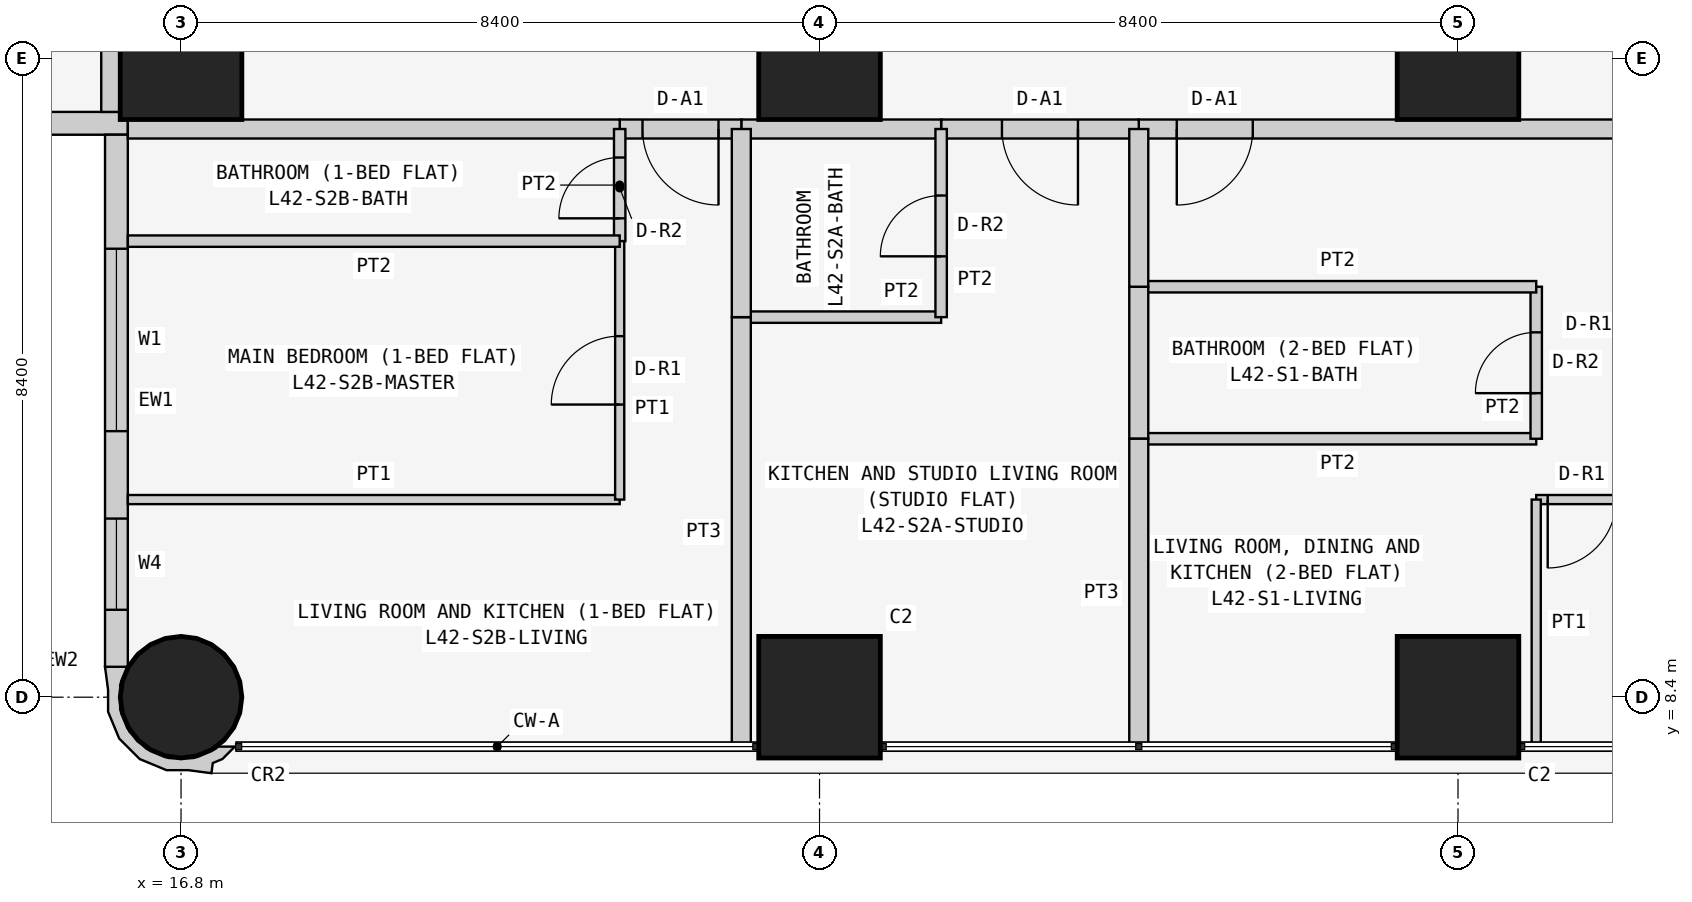
"""IFC4 building model, lengths in metres.
Left out: names, types, materials, properties, quantities, classifications, styles, units other than length and angle.
Written with IfcOpenShell. Run it as: python <this file> out.ifc"""

import sys

from ifc_helpers import new_model, si_unit, direction, frame, frame_2d, origin, origin_2d, place, context, subcontext, project, spatial, polyline, rectangle, circle, outline, extrude, element, fill, save


model = new_model("IFC4")
c1 = context("Model", 3, precision=1e-05, world=origin(), true_north=direction((0.0, 1.0)))
c2 = subcontext(c1, "Body", "Model", "MODEL_VIEW")
j1 = project(units=[si_unit("LENGTHUNIT", "METRE"), si_unit("PLANEANGLEUNIT", "RADIAN")], contexts=[c1])
p1 = place(None, origin())
s1 = spatial("IfcSite", under=j1, at=p1, CompositionType="ELEMENT")
p2 = place(p1, origin())
s2 = spatial("IfcBuilding", under=s1, at=p2, CompositionType="ELEMENT")
p3 = place(p2, frame((0.0, 0.0, 162.9)))
s3 = spatial("IfcBuildingStorey", under=s2, at=p3, CompositionType="ELEMENT", Elevation=162.9)
p4 = place(p3, frame((16.8, 8.4, 0.0), z_axis=(0.0, 0.0, 1.0), x_axis=(1.0, 0.0, 0.0)))
e1 = element("IfcColumn", 1, at=p4, inside=s3, PredefinedType="COLUMN", context=c2, shape_type="SweptSolid", body=[
    extrude(circle(Radius=0.8, at=origin_2d()), origin(), (0.0, 0.0, 1.0), 3.6),
])
for number, where, z_axis, x_axis in (
    (2, (16.8, 16.8, 0.0), (0.0, 0.0, 1.0), (1.0, 0.0, 0.0)),
    (3, (25.2, 8.4, 0.0), (0.0, 0.0, 1.0), (1.0, 0.0, 0.0)),
    (4, (25.2, 16.8, 0.0), (0.0, 0.0, 1.0), (1.0, 0.0, 0.0)),
    (5, (33.6, 8.4, 0.0), (0.0, 0.0, 1.0), (1.0, 0.0, 0.0)),
    (6, (33.6, 16.8, 0.0), (0.0, 0.0, 1.0), (1.0, 0.0, 0.0)),
):
    element("IfcColumn", number, at=place(p3, frame(where, z_axis=z_axis, x_axis=x_axis)), inside=s3, PredefinedType="COLUMN", context=c2, shape_type="SweptSolid", body=[
        extrude(rectangle(XDim=1.6, YDim=1.6, at=origin_2d()), origin(), (0.0, 0.0, 1.0), 3.6),
    ])
p5 = place(p3, frame((0.4, 15.95, 0.0), z_axis=(0.0, 0.0, 1.0), x_axis=(1.0, 0.0, 0.0)))
e7 = element("IfcWall", 7, at=p5, inside=s3, PredefinedType="SOLIDWALL", context=c2, shape_type="SweptSolid", body=[
    extrude(rectangle(XDim=15.7, YDim=0.3, at=frame_2d((7.85, 0.0))), origin(), (0.0, 0.0, 1.0), 3.45),
])
p6 = place(p5, frame((12.4, 0.0, 0.9)))
e8 = element("IfcOpeningElement", 8, at=p6, cuts=e7, PredefinedType="OPENING", context=c2, shape_type="SweptSolid", body=[
    extrude(rectangle(XDim=1.8, YDim=1.5, at=frame_2d((0.9, 0.75))), frame((0.0, 0.16, 0.0), z_axis=(0.0, -1.0, 0.0), x_axis=(1.0, 0.0, 0.0)), (0.0, 0.0, 1.0), 0.32),
])
p7 = place(p5, frame((9.55, 0.0, 1.5)))
e9 = element("IfcOpeningElement", 9, at=p7, cuts=e7, PredefinedType="OPENING", context=c2, shape_type="SweptSolid", body=[
    extrude(rectangle(XDim=0.9, YDim=0.7, at=frame_2d((0.45, 0.35))), frame((0.0, 0.16, 0.0), z_axis=(0.0, -1.0, 0.0), x_axis=(1.0, 0.0, 0.0)), (0.0, 0.0, 1.0), 0.32),
])
p8 = place(p5, frame((5.1, 0.0, 0.9)))
e10 = element("IfcOpeningElement", 10, at=p8, cuts=e7, PredefinedType="OPENING", context=c2, shape_type="SweptSolid", body=[
    extrude(rectangle(XDim=1.8, YDim=1.5, at=frame_2d((0.9, 0.75))), frame((0.0, 0.16, 0.0), z_axis=(0.0, -1.0, 0.0), x_axis=(1.0, 0.0, 0.0)), (0.0, 0.0, 1.0), 0.32),
])
p9 = place(p5, frame((2.0, 0.0, 0.0)))
e11 = element("IfcOpeningElement", 11, at=p9, cuts=e7, PredefinedType="OPENING", context=c2, shape_type="SweptSolid", body=[
    extrude(rectangle(XDim=0.9, YDim=2.4, at=frame_2d((0.45, 1.2))), frame((0.0, 0.16, 0.0), z_axis=(0.0, -1.0, 0.0), x_axis=(1.0, 0.0, 0.0)), (0.0, 0.0, 1.0), 0.32),
])
p10 = place(p5, frame((0.7, 0.0, 0.9)))
e12 = element("IfcOpeningElement", 12, at=p10, cuts=e7, PredefinedType="OPENING", context=c2, shape_type="SweptSolid", body=[
    extrude(rectangle(XDim=1.2, YDim=1.5, at=frame_2d((0.6, 0.75))), frame((0.0, 0.16, 0.0), z_axis=(0.0, -1.0, 0.0), x_axis=(1.0, 0.0, 0.0)), (0.0, 0.0, 1.0), 0.32),
])
p11 = place(p3, frame((15.95, 15.8, 0.0), z_axis=(0.0, 0.0, 1.0), x_axis=(0.0, -1.0, 0.0)))
e13 = element("IfcWall", 13, at=p11, inside=s3, PredefinedType="SOLIDWALL", context=c2, shape_type="SweptSolid", body=[
    extrude(rectangle(XDim=7.0, YDim=0.3, at=frame_2d((3.5, 0.0))), origin(), (0.0, 0.0, 1.0), 3.45),
])
p12 = place(p11, frame((1.5, 0.0, 0.9)))
e14 = element("IfcOpeningElement", 14, at=p12, cuts=e13, PredefinedType="OPENING", context=c2, shape_type="SweptSolid", body=[
    extrude(rectangle(XDim=2.4, YDim=1.5, at=frame_2d((1.2, 0.75))), frame((0.0, 0.16, 0.0), z_axis=(0.0, -1.0, 0.0), x_axis=(1.0, 0.0, 0.0)), (0.0, 0.0, 1.0), 0.32),
])
p13 = place(p11, frame((5.05, 0.0, 0.9)))
e15 = element("IfcOpeningElement", 15, at=p13, cuts=e13, PredefinedType="OPENING", context=c2, shape_type="SweptSolid", body=[
    extrude(rectangle(XDim=1.2, YDim=1.5, at=frame_2d((0.6, 0.75))), frame((0.0, 0.16, 0.0), z_axis=(0.0, -1.0, 0.0), x_axis=(1.0, 0.0, 0.0)), (0.0, 0.0, 1.0), 0.32),
])
p14 = place(p3, frame((15.983, 8.727, 0.0), z_axis=(0.0, 0.0, 1.0), x_axis=(-0.343276641956, -0.93923434088, 0.0)))
e16 = element("IfcWall", 16, at=p14, inside=s3, PredefinedType="SOLIDWALL", context=c2, shape_type="SweptSolid", body=[
    extrude(outline(polyline([(0.829, 1.599), (0.697, 1.569), (0.604, 1.67), (0.394, 1.767), (0.471, 1.556), (0.509, 1.539), (0.724, 1.304), (0.833, 1.005), (0.82, 0.686), (0.686, 0.397), (0.451, 0.182), (0.152, 0.073), (-0.116, 0.084), (-0.127, 0.078), (-0.146, 0.071), (-0.006, -0.197), (0.266, -0.055), (0.535, 0.044), (0.817, 0.302), (0.978, 0.648), (0.994, 1.03), (0.895, 1.3), (0.829, 1.599)])), origin(), (0.0, 0.0, 1.0), 3.45),
])
p15 = place(p3, frame((35.829, 15.875, 0.0), z_axis=(0.0, 0.0, 1.0), x_axis=(-1.0, 0.0, 0.0)))
e17 = element("IfcWall", 17, at=p15, inside=s3, PredefinedType="PARTITIONING", context=c2, shape_type="SweptSolid", body=[
    extrude(rectangle(XDim=6.429, YDim=0.25, at=frame_2d((3.215, 0.0))), origin(), (0.0, 0.0, 1.0), 3.45),
])
p16 = place(p15, frame((4.929, 0.0, 0.0)))
e18 = element("IfcOpeningElement", 18, at=p16, cuts=e17, PredefinedType="OPENING", context=c2, shape_type="SweptSolid", body=[
    extrude(rectangle(XDim=1.0, YDim=2.1, at=frame_2d((0.5, 1.05))), frame((0.0, 0.135, 0.0), z_axis=(0.0, -1.0, 0.0), x_axis=(1.0, 0.0, 0.0)), (0.0, 0.0, 1.0), 0.27),
])
p17 = place(p3, frame((29.4, 15.875, 0.0), z_axis=(0.0, 0.0, 1.0), x_axis=(-1.0, 0.0, 0.0)))
e19 = element("IfcWall", 19, at=p17, inside=s3, PredefinedType="PARTITIONING", context=c2, shape_type="SweptSolid", body=[
    extrude(rectangle(XDim=2.6, YDim=0.25, at=frame_2d((1.3, 0.0))), origin(), (0.0, 0.0, 1.0), 3.45),
])
p18 = place(p17, frame((0.8, 0.0, 0.0)))
e20 = element("IfcOpeningElement", 20, at=p18, cuts=e19, PredefinedType="OPENING", context=c2, shape_type="SweptSolid", body=[
    extrude(rectangle(XDim=1.0, YDim=2.1, at=frame_2d((0.5, 1.05))), frame((0.0, 0.135, 0.0), z_axis=(0.0, -1.0, 0.0), x_axis=(1.0, 0.0, 0.0)), (0.0, 0.0, 1.0), 0.27),
])
p19 = place(p3, frame((26.8, 15.875, 0.0), z_axis=(0.0, 0.0, 1.0), x_axis=(-1.0, 0.0, 0.0)))
e21 = element("IfcWall", 21, at=p19, inside=s3, PredefinedType="PARTITIONING", context=c2, shape_type="SweptSolid", body=[
    extrude(rectangle(XDim=2.629, YDim=0.25, at=frame_2d((1.314, 0.0))), origin(), (0.0, 0.0, 1.0), 3.45),
])
p20 = place(p3, frame((24.171, 15.875, 0.0), z_axis=(0.0, 0.0, 1.0), x_axis=(-1.0, 0.0, 0.0)))
e22 = element("IfcWall", 22, at=p20, inside=s3, PredefinedType="PARTITIONING", context=c2, shape_type="SweptSolid", body=[
    extrude(rectangle(XDim=1.6, YDim=0.25, at=frame_2d((0.8, 0.0))), origin(), (0.0, 0.0, 1.0), 3.45),
])
p21 = place(p20, frame((0.3, 0.0, 0.0)))
e23 = element("IfcOpeningElement", 23, at=p21, cuts=e22, PredefinedType="OPENING", context=c2, shape_type="SweptSolid", body=[
    extrude(rectangle(XDim=1.0, YDim=2.1, at=frame_2d((0.5, 1.05))), frame((0.0, 0.135, 0.0), z_axis=(0.0, -1.0, 0.0), x_axis=(1.0, 0.0, 0.0)), (0.0, 0.0, 1.0), 0.27),
])
p22 = place(p3, frame((22.571, 15.875, 0.0), z_axis=(0.0, 0.0, 1.0), x_axis=(-1.0, 0.0, 0.0)))
e24 = element("IfcWall", 24, at=p22, inside=s3, PredefinedType="PARTITIONING", context=c2, shape_type="SweptSolid", body=[
    extrude(rectangle(XDim=6.471, YDim=0.25, at=frame_2d((3.235, 0.0))), origin(), (0.0, 0.0, 1.0), 3.45),
])
p23 = place(p3, frame((15.875, 16.1, 0.0), z_axis=(0.0, 0.0, 1.0), x_axis=(0.0, 1.0, 0.0)))
e25 = element("IfcWall", 25, at=p23, inside=s3, PredefinedType="PARTITIONING", context=c2, shape_type="SweptSolid", body=[
    extrude(rectangle(XDim=6.871, YDim=0.25, at=frame_2d((3.436, 0.0))), origin(), (0.0, 0.0, 1.0), 3.45),
])
p24 = place(p3, frame((29.4, 11.8, 0.0), z_axis=(0.0, 0.0, 1.0), x_axis=(1.0, 0.0, 0.0)))
e26 = element("IfcWall", 26, at=p24, inside=s3, PredefinedType="PARTITIONING", context=c2, shape_type="SweptSolid", body=[
    extrude(rectangle(XDim=5.229, YDim=0.15, at=frame_2d((2.615, 0.0))), origin(), (0.0, 0.0, 1.0), 3.45),
])
p25 = place(p3, frame((34.629, 11.8, 0.0), z_axis=(0.0, 0.0, 1.0), x_axis=(0.0, 1.0, 0.0)))
e27 = element("IfcWall", 27, at=p25, inside=s3, PredefinedType="PARTITIONING", context=c2, shape_type="SweptSolid", body=[
    extrude(rectangle(XDim=2.0, YDim=0.15, at=frame_2d((1.0, 0.0))), origin(), (0.0, 0.0, 1.0), 3.45),
])
p26 = place(p25, frame((0.6, 0.0, 0.0)))
e28 = element("IfcOpeningElement", 28, at=p26, cuts=e27, PredefinedType="OPENING", context=c2, shape_type="SweptSolid", body=[
    extrude(rectangle(XDim=0.8, YDim=2.1, at=frame_2d((0.4, 1.05))), frame((0.0, 0.085, 0.0), z_axis=(0.0, -1.0, 0.0), x_axis=(1.0, 0.0, 0.0)), (0.0, 0.0, 1.0), 0.17),
])
p27 = place(p3, frame((34.629, 13.8, 0.0), z_axis=(0.0, 0.0, 1.0), x_axis=(-1.0, 0.0, 0.0)))
e29 = element("IfcWall", 29, at=p27, inside=s3, PredefinedType="PARTITIONING", context=c2, shape_type="SweptSolid", body=[
    extrude(rectangle(XDim=5.229, YDim=0.15, at=frame_2d((2.615, 0.0))), origin(), (0.0, 0.0, 1.0), 3.45),
])
p28 = place(p3, frame((29.4, 13.8, 0.0), z_axis=(0.0, 0.0, 1.0), x_axis=(0.0, -1.0, 0.0)))
e30 = element("IfcWall", 30, at=p28, inside=s3, PredefinedType="PARTITIONING", context=c2, shape_type="SweptSolid", body=[
    extrude(rectangle(XDim=2.0, YDim=0.25, at=frame_2d((1.0, 0.0))), origin(), (0.0, 0.0, 1.0), 2.848),
])
p29 = place(p3, frame((35.829, 11.0, 0.0), z_axis=(0.0, 0.0, 1.0), x_axis=(-1.0, 0.0, 0.0)))
e31 = element("IfcWall", 31, at=p29, inside=s3, PredefinedType="PARTITIONING", context=c2, shape_type="SweptSolid", body=[
    extrude(rectangle(XDim=1.2, YDim=0.12, at=frame_2d((0.6, 0.0))), origin(), (0.0, 0.0, 1.0), 3.45),
])
p30 = place(p29, frame((0.149, 0.0, 0.0)))
e32 = element("IfcOpeningElement", 32, at=p30, cuts=e31, PredefinedType="OPENING", context=c2, shape_type="SweptSolid", body=[
    extrude(rectangle(XDim=0.9, YDim=2.1, at=frame_2d((0.45, 1.05))), frame((0.0, 0.07, 0.0), z_axis=(0.0, -1.0, 0.0), x_axis=(1.0, 0.0, 0.0)), (0.0, 0.0, 1.0), 0.14),
])
p31 = place(p3, frame((34.629, 11.0, 0.0), z_axis=(0.0, 0.0, 1.0), x_axis=(0.0, -1.0, 0.0)))
e33 = element("IfcWall", 33, at=p31, inside=s3, PredefinedType="PARTITIONING", context=c2, shape_type="SweptSolid", body=[
    extrude(rectangle(XDim=3.25, YDim=0.12, at=frame_2d((1.625, 0.0))), origin(), (0.0, 0.0, 1.0), 3.45),
])
p32 = place(p3, frame((29.4, 7.75, 0.0), z_axis=(0.0, 0.0, 1.0), x_axis=(0.0, 1.0, 0.0)))
e34 = element("IfcWall", 34, at=p32, inside=s3, PredefinedType="PARTITIONING", context=c2, shape_type="SweptSolid", body=[
    extrude(rectangle(XDim=4.05, YDim=0.25, at=frame_2d((2.025, 0.0))), origin(), (0.0, 0.0, 1.0), 2.848),
])
p33 = place(p3, frame((29.4, 13.8, 0.0), z_axis=(0.0, 0.0, 1.0), x_axis=(0.0, 1.0, 0.0)))
e35 = element("IfcWall", 35, at=p33, inside=s3, PredefinedType="PARTITIONING", context=c2, shape_type="SweptSolid", body=[
    extrude(rectangle(XDim=2.075, YDim=0.25, at=frame_2d((1.038, 0.0))), origin(), (0.0, 0.0, 1.0), 2.848),
])
p34 = place(p3, frame((24.171, 13.4, 0.0), z_axis=(0.0, 0.0, 1.0), x_axis=(1.0, 0.0, 0.0)))
e36 = element("IfcWall", 36, at=p34, inside=s3, PredefinedType="PARTITIONING", context=c2, shape_type="SweptSolid", body=[
    extrude(rectangle(XDim=2.629, YDim=0.15, at=frame_2d((1.314, 0.0))), origin(), (0.0, 0.0, 1.0), 3.45),
])
p35 = place(p3, frame((26.8, 13.4, 0.0), z_axis=(0.0, 0.0, 1.0), x_axis=(0.0, 1.0, 0.0)))
e37 = element("IfcWall", 37, at=p35, inside=s3, PredefinedType="PARTITIONING", context=c2, shape_type="SweptSolid", body=[
    extrude(rectangle(XDim=2.475, YDim=0.15, at=frame_2d((1.238, 0.0))), origin(), (0.0, 0.0, 1.0), 3.45),
])
p36 = place(p35, frame((0.8, 0.0, 0.0)))
e38 = element("IfcOpeningElement", 38, at=p36, cuts=e37, PredefinedType="OPENING", context=c2, shape_type="SweptSolid", body=[
    extrude(rectangle(XDim=0.8, YDim=2.1, at=frame_2d((0.4, 1.05))), frame((0.0, 0.085, 0.0), z_axis=(0.0, -1.0, 0.0), x_axis=(1.0, 0.0, 0.0)), (0.0, 0.0, 1.0), 0.17),
])
p37 = place(p3, frame((24.171, 7.75, 0.0), z_axis=(0.0, 0.0, 1.0), x_axis=(0.0, 1.0, 0.0)))
e39 = element("IfcWall", 39, at=p37, inside=s3, PredefinedType="PARTITIONING", context=c2, shape_type="SweptSolid", body=[
    extrude(rectangle(XDim=5.65, YDim=0.25, at=frame_2d((2.825, 0.0))), origin(), (0.0, 0.0, 1.0), 3.45),
])
p38 = place(p3, frame((24.171, 13.4, 0.0), z_axis=(0.0, 0.0, 1.0), x_axis=(0.0, 1.0, 0.0)))
e40 = element("IfcWall", 40, at=p38, inside=s3, PredefinedType="PARTITIONING", context=c2, shape_type="SweptSolid", body=[
    extrude(rectangle(XDim=2.475, YDim=0.25, at=frame_2d((1.238, 0.0))), origin(), (0.0, 0.0, 1.0), 3.45),
])
p39 = place(p3, frame((22.571, 14.4, 0.0), z_axis=(0.0, 0.0, 1.0), x_axis=(0.0, 1.0, 0.0)))
e41 = element("IfcWall", 41, at=p39, inside=s3, PredefinedType="PARTITIONING", context=c2, shape_type="SweptSolid", body=[
    extrude(rectangle(XDim=1.475, YDim=0.15, at=frame_2d((0.738, 0.0))), origin(), (0.0, 0.0, 1.0), 3.45),
])
p40 = place(p39, frame((0.3, 0.0, 0.0)))
e42 = element("IfcOpeningElement", 42, at=p40, cuts=e41, PredefinedType="OPENING", context=c2, shape_type="SweptSolid", body=[
    extrude(rectangle(XDim=0.8, YDim=2.1, at=frame_2d((0.4, 1.05))), frame((0.0, 0.085, 0.0), z_axis=(0.0, -1.0, 0.0), x_axis=(1.0, 0.0, 0.0)), (0.0, 0.0, 1.0), 0.17),
])
p41 = place(p3, frame((16.1, 11.0, 0.0), z_axis=(0.0, 0.0, 1.0), x_axis=(1.0, 0.0, 0.0)))
e43 = element("IfcWall", 43, at=p41, inside=s3, PredefinedType="PARTITIONING", context=c2, shape_type="SweptSolid", body=[
    extrude(rectangle(XDim=6.471, YDim=0.12, at=frame_2d((3.235, 0.0))), origin(), (0.0, 0.0, 1.0), 3.45),
])
p42 = place(p3, frame((22.571, 11.0, 0.0), z_axis=(0.0, 0.0, 1.0), x_axis=(0.0, 1.0, 0.0)))
e44 = element("IfcWall", 44, at=p42, inside=s3, PredefinedType="PARTITIONING", context=c2, shape_type="SweptSolid", body=[
    extrude(rectangle(XDim=3.4, YDim=0.12, at=frame_2d((1.7, 0.0))), origin(), (0.0, 0.0, 1.0), 3.45),
])
p43 = place(p42, frame((1.25, 0.0, 0.0)))
e45 = element("IfcOpeningElement", 45, at=p43, cuts=e44, PredefinedType="OPENING", context=c2, shape_type="SweptSolid", body=[
    extrude(rectangle(XDim=0.9, YDim=2.1, at=frame_2d((0.45, 1.05))), frame((0.0, 0.07, 0.0), z_axis=(0.0, -1.0, 0.0), x_axis=(1.0, 0.0, 0.0)), (0.0, 0.0, 1.0), 0.14),
])
p44 = place(p3, frame((22.571, 14.4, 0.0), z_axis=(0.0, 0.0, 1.0), x_axis=(-1.0, 0.0, 0.0)))
e46 = element("IfcWall", 46, at=p44, inside=s3, PredefinedType="PARTITIONING", context=c2, shape_type="SweptSolid", body=[
    extrude(rectangle(XDim=6.471, YDim=0.15, at=frame_2d((3.235, 0.0))), origin(), (0.0, 0.0, 1.0), 3.45),
])
p45 = place(p12, origin())
e47 = element("IfcWindow", 47, at=p45, inside=s3, PartitioningType="SINGLE_PANEL", PredefinedType="WINDOW", context=c2, shape_type="SweptSolid", body=[
    extrude(rectangle(XDim=2.4, YDim=1.5, at=frame_2d((1.2, 0.75))), frame((0.0, 0.03, 0.0), z_axis=(0.0, -1.0, 0.0), x_axis=(1.0, 0.0, 0.0)), (0.0, 0.0, 1.0), 0.06),
])
fill(e14, e47)
p46 = place(p13, origin())
e48 = element("IfcWindow", 48, at=p46, inside=s3, PartitioningType="SINGLE_PANEL", PredefinedType="WINDOW", context=c2, shape_type="SweptSolid", body=[
    extrude(rectangle(XDim=1.2, YDim=1.5, at=frame_2d((0.6, 0.75))), frame((0.0, 0.03, 0.0), z_axis=(0.0, -1.0, 0.0), x_axis=(1.0, 0.0, 0.0)), (0.0, 0.0, 1.0), 0.06),
])
fill(e15, e48)
p47 = place(p16, origin())
e49 = element("IfcDoor", 49, at=p47, inside=s3, OperationType="SINGLE_SWING_RIGHT", PredefinedType="DOOR", context=c2, shape_type="SweptSolid", body=[
    extrude(rectangle(XDim=1.0, YDim=2.1, at=frame_2d((0.5, 1.05))), frame((0.0, 0.025, 0.0), z_axis=(0.0, -1.0, 0.0), x_axis=(1.0, 0.0, 0.0)), (0.0, 0.0, 1.0), 0.05),
])
fill(e18, e49)
p48 = place(p26, origin())
e50 = element("IfcDoor", 50, at=p48, inside=s3, OperationType="SINGLE_SWING_LEFT", PredefinedType="DOOR", context=c2, shape_type="SweptSolid", body=[
    extrude(rectangle(XDim=0.8, YDim=2.1, at=frame_2d((0.4, 1.05))), frame((0.0, 0.025, 0.0), z_axis=(0.0, -1.0, 0.0), x_axis=(1.0, 0.0, 0.0)), (0.0, 0.0, 1.0), 0.05),
])
fill(e28, e50)
p49 = place(p30, origin())
e51 = element("IfcDoor", 51, at=p49, inside=s3, OperationType="SINGLE_SWING_RIGHT", PredefinedType="DOOR", context=c2, shape_type="SweptSolid", body=[
    extrude(rectangle(XDim=0.9, YDim=2.1, at=frame_2d((0.45, 1.05))), frame((0.0, 0.025, 0.0), z_axis=(0.0, -1.0, 0.0), x_axis=(1.0, 0.0, 0.0)), (0.0, 0.0, 1.0), 0.05),
])
fill(e32, e51)
p50 = place(p18, origin())
e52 = element("IfcDoor", 52, at=p50, inside=s3, OperationType="SINGLE_SWING_LEFT", PredefinedType="DOOR", context=c2, shape_type="SweptSolid", body=[
    extrude(rectangle(XDim=1.0, YDim=2.1, at=frame_2d((0.5, 1.05))), frame((0.0, 0.025, 0.0), z_axis=(0.0, -1.0, 0.0), x_axis=(1.0, 0.0, 0.0)), (0.0, 0.0, 1.0), 0.05),
])
fill(e20, e52)
p51 = place(p36, origin())
e53 = element("IfcDoor", 53, at=p51, inside=s3, OperationType="SINGLE_SWING_LEFT", PredefinedType="DOOR", context=c2, shape_type="SweptSolid", body=[
    extrude(rectangle(XDim=0.8, YDim=2.1, at=frame_2d((0.4, 1.05))), frame((0.0, 0.025, 0.0), z_axis=(0.0, -1.0, 0.0), x_axis=(1.0, 0.0, 0.0)), (0.0, 0.0, 1.0), 0.05),
])
fill(e38, e53)
p52 = place(p21, origin())
e54 = element("IfcDoor", 54, at=p52, inside=s3, OperationType="SINGLE_SWING_LEFT", PredefinedType="DOOR", context=c2, shape_type="SweptSolid", body=[
    extrude(rectangle(XDim=1.0, YDim=2.1, at=frame_2d((0.5, 1.05))), frame((0.0, 0.025, 0.0), z_axis=(0.0, -1.0, 0.0), x_axis=(1.0, 0.0, 0.0)), (0.0, 0.0, 1.0), 0.05),
])
fill(e23, e54)
p53 = place(p40, origin())
e55 = element("IfcDoor", 55, at=p53, inside=s3, OperationType="SINGLE_SWING_LEFT", PredefinedType="DOOR", context=c2, shape_type="SweptSolid", body=[
    extrude(rectangle(XDim=0.8, YDim=2.1, at=frame_2d((0.4, 1.05))), frame((0.0, 0.025, 0.0), z_axis=(0.0, -1.0, 0.0), x_axis=(1.0, 0.0, 0.0)), (0.0, 0.0, 1.0), 0.05),
])
fill(e42, e55)
p54 = place(p43, origin())
e56 = element("IfcDoor", 56, at=p54, inside=s3, OperationType="SINGLE_SWING_LEFT", PredefinedType="DOOR", context=c2, shape_type="SweptSolid", body=[
    extrude(rectangle(XDim=0.9, YDim=2.1, at=frame_2d((0.45, 1.05))), frame((0.0, 0.025, 0.0), z_axis=(0.0, -1.0, 0.0), x_axis=(1.0, 0.0, 0.0)), (0.0, 0.0, 1.0), 0.05),
])
fill(e45, e56)
save(model, sys.argv[1])
